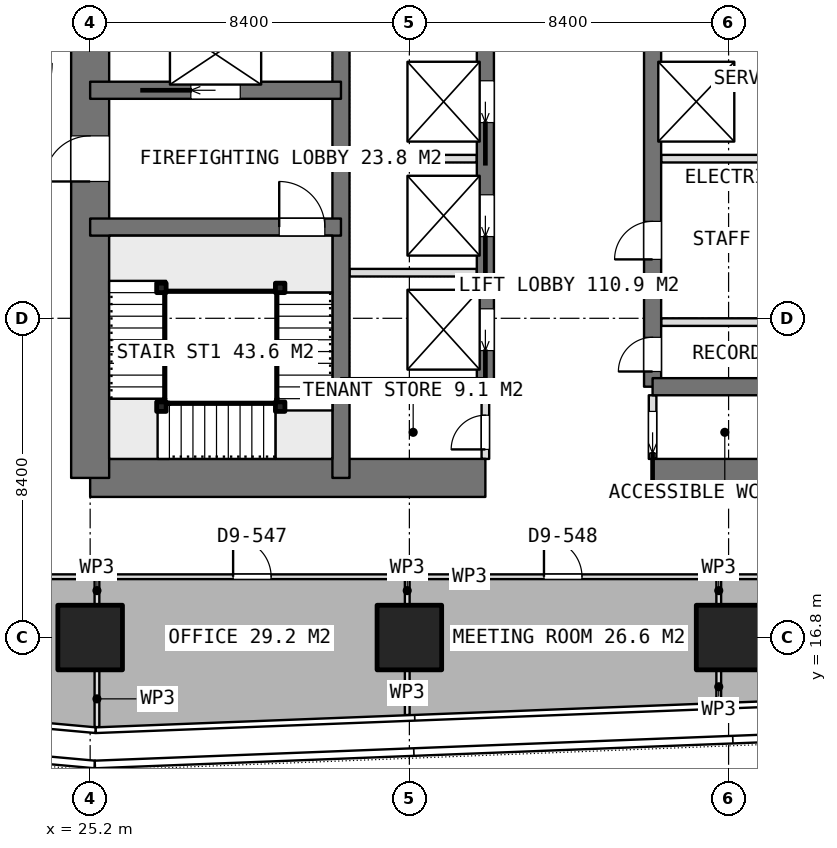
"""IFC4 building model, lengths in metres.
Left out: names, types, materials, properties, quantities, classifications, styles, units other than length and angle.
Written with IfcOpenShell. Run it as: python <this file> out.ifc"""

import sys

from ifc_helpers import new_model, si_unit, direction, frame, frame_2d, origin, origin_2d, place, context, subcontext, project, spatial, rectangle, extrude, element, fill, save


model = new_model("IFC4")
c1 = context("Model", 3, precision=1e-05, world=origin(), true_north=direction((0.0, 1.0)))
c2 = subcontext(c1, "Body", "Model", "MODEL_VIEW")
j1 = project(units=[si_unit("LENGTHUNIT", "METRE"), si_unit("PLANEANGLEUNIT", "RADIAN")], contexts=[c1])
p1 = place(None, origin())
s1 = spatial("IfcSite", under=j1, at=p1, CompositionType="ELEMENT")
p2 = place(p1, origin())
s2 = spatial("IfcBuilding", under=s1, at=p2, CompositionType="ELEMENT")
p3 = place(p2, frame((0.0, 0.0, 140.3)))
s3 = spatial("IfcBuildingStorey", under=s2, at=p3, CompositionType="ELEMENT", Elevation=140.3)
p4 = place(p3, frame((25.2, 21.0, 0.0), z_axis=(0.0, 0.0, 1.0), x_axis=(1.0, 0.0, 0.0)))
e1 = element("IfcWall", 1, at=p4, inside=s3, PredefinedType="SHEAR", context=c2, shape_type="SweptSolid", body=[
    extrude(rectangle(XDim=10.4, YDim=1.0, at=frame_2d((5.2, 0.0))), origin(), (0.0, 0.0, 1.0), 3.75),
])
p5 = place(p3, frame((40.0, 21.0, 0.0), z_axis=(0.0, 0.0, 1.0), x_axis=(1.0, 0.0, 0.0)))
e2 = element("IfcWall", 2, at=p5, inside=s3, PredefinedType="SHEAR", context=c2, shape_type="SweptSolid", body=[
    extrude(rectangle(XDim=10.4, YDim=1.0, at=frame_2d((5.2, 0.0))), origin(), (0.0, 0.0, 1.0), 3.75),
])
p6 = place(p3, frame((25.2, 21.0, 0.0), z_axis=(0.0, 0.0, 1.0), x_axis=(0.0, 1.0, 0.0)))
e3 = element("IfcWall", 3, at=p6, inside=s3, PredefinedType="SHEAR", context=c2, shape_type="SweptSolid", body=[
    extrude(rectangle(XDim=25.2, YDim=1.0, at=frame_2d((12.6, 0.0))), origin(), (0.0, 0.0, 1.0), 3.75),
])
p7 = place(p6, frame((7.8, 0.0, 0.0)))
e4 = element("IfcOpeningElement", 4, at=p7, cuts=e3, PredefinedType="OPENING", context=c2, shape_type="SweptSolid", body=[
    extrude(rectangle(XDim=1.2, YDim=2.1, at=frame_2d((0.6, 1.05))), frame((0.0, 0.51, 0.0), z_axis=(0.0, -1.0, 0.0), x_axis=(1.0, 0.0, 0.0)), (0.0, 0.0, 1.0), 1.02),
])
p8 = place(p6, frame((14.25, 0.0, 0.0)))
e5 = element("IfcOpeningElement", 5, at=p8, cuts=e3, PredefinedType="OPENING", context=c2, shape_type="SweptSolid", body=[
    extrude(rectangle(XDim=0.9, YDim=2.1, at=frame_2d((0.45, 1.05))), frame((0.0, 0.51, 0.0), z_axis=(0.0, -1.0, 0.0), x_axis=(1.0, 0.0, 0.0)), (0.0, 0.0, 1.0), 1.02),
])
p9 = place(p6, frame((16.85, 0.0, 0.0)))
e6 = element("IfcOpeningElement", 6, at=p9, cuts=e3, PredefinedType="OPENING", context=c2, shape_type="SweptSolid", body=[
    extrude(rectangle(XDim=0.9, YDim=2.1, at=frame_2d((0.45, 1.05))), frame((0.0, 0.51, 0.0), z_axis=(0.0, -1.0, 0.0), x_axis=(1.0, 0.0, 0.0)), (0.0, 0.0, 1.0), 1.02),
])
p10 = place(p6, frame((19.025, 0.0, 0.0)))
e7 = element("IfcOpeningElement", 7, at=p10, cuts=e3, PredefinedType="OPENING", context=c2, shape_type="SweptSolid", body=[
    extrude(rectangle(XDim=1.2, YDim=2.1, at=frame_2d((0.6, 1.05))), frame((0.0, 0.51, 0.0), z_axis=(0.0, -1.0, 0.0), x_axis=(1.0, 0.0, 0.0)), (0.0, 0.0, 1.0), 1.02),
])
p11 = place(p3, frame((31.8, 21.0, 0.0), z_axis=(0.0, 0.0, 1.0), x_axis=(0.0, 1.0, 0.0)))
e8 = element("IfcWall", 8, at=p11, inside=s3, PredefinedType="SHEAR", context=c2, shape_type="SweptSolid", body=[
    extrude(rectangle(XDim=25.2, YDim=0.45, at=frame_2d((12.6, 0.0))), origin(), (0.0, 0.0, 1.0), 3.75),
])
p12 = place(p3, frame((35.6, 23.4, 0.0), z_axis=(0.0, 0.0, 1.0), x_axis=(0.0, 1.0, 0.0)))
e9 = element("IfcWall", 9, at=p12, inside=s3, PredefinedType="SHEAR", context=c2, shape_type="SweptSolid", body=[
    extrude(rectangle(XDim=18.0, YDim=0.45, at=frame_2d((9.0, 0.0))), origin(), (0.0, 0.0, 1.0), 3.75),
])
p13 = place(p12, frame((0.95, 0.0, 0.0)))
e10 = element("IfcOpeningElement", 10, at=p13, cuts=e9, PredefinedType="OPENING", context=c2, shape_type="SweptSolid", body=[
    extrude(rectangle(XDim=1.1, YDim=2.1, at=frame_2d((0.55, 1.05))), frame((0.0, 0.235, 0.0), z_axis=(0.0, -1.0, 0.0), x_axis=(1.0, 0.0, 0.0)), (0.0, 0.0, 1.0), 0.47),
])
p14 = place(p12, frame((3.95, 0.0, 0.0)))
e11 = element("IfcOpeningElement", 11, at=p14, cuts=e9, PredefinedType="OPENING", context=c2, shape_type="SweptSolid", body=[
    extrude(rectangle(XDim=1.1, YDim=2.1, at=frame_2d((0.55, 1.05))), frame((0.0, 0.235, 0.0), z_axis=(0.0, -1.0, 0.0), x_axis=(1.0, 0.0, 0.0)), (0.0, 0.0, 1.0), 0.47),
])
p15 = place(p12, frame((6.95, 0.0, 0.0)))
e12 = element("IfcOpeningElement", 12, at=p15, cuts=e9, PredefinedType="OPENING", context=c2, shape_type="SweptSolid", body=[
    extrude(rectangle(XDim=1.1, YDim=2.1, at=frame_2d((0.55, 1.05))), frame((0.0, 0.235, 0.0), z_axis=(0.0, -1.0, 0.0), x_axis=(1.0, 0.0, 0.0)), (0.0, 0.0, 1.0), 0.47),
])
p16 = place(p12, frame((9.95, 0.0, 0.0)))
e13 = element("IfcOpeningElement", 13, at=p16, cuts=e9, PredefinedType="OPENING", context=c2, shape_type="SweptSolid", body=[
    extrude(rectangle(XDim=1.1, YDim=2.1, at=frame_2d((0.55, 1.05))), frame((0.0, 0.235, 0.0), z_axis=(0.0, -1.0, 0.0), x_axis=(1.0, 0.0, 0.0)), (0.0, 0.0, 1.0), 0.47),
])
p17 = place(p12, frame((12.95, 0.0, 0.0)))
e14 = element("IfcOpeningElement", 14, at=p17, cuts=e9, PredefinedType="OPENING", context=c2, shape_type="SweptSolid", body=[
    extrude(rectangle(XDim=1.1, YDim=2.1, at=frame_2d((0.55, 1.05))), frame((0.0, 0.235, 0.0), z_axis=(0.0, -1.0, 0.0), x_axis=(1.0, 0.0, 0.0)), (0.0, 0.0, 1.0), 0.47),
])
p18 = place(p12, frame((15.95, 0.0, 0.0)))
e15 = element("IfcOpeningElement", 15, at=p18, cuts=e9, PredefinedType="OPENING", context=c2, shape_type="SweptSolid", body=[
    extrude(rectangle(XDim=1.1, YDim=2.1, at=frame_2d((0.55, 1.05))), frame((0.0, 0.235, 0.0), z_axis=(0.0, -1.0, 0.0), x_axis=(1.0, 0.0, 0.0)), (0.0, 0.0, 1.0), 0.47),
])
p19 = place(p3, frame((40.0, 23.4, 0.0), z_axis=(0.0, 0.0, 1.0), x_axis=(0.0, 1.0, 0.0)))
e16 = element("IfcWall", 16, at=p19, inside=s3, PredefinedType="SHEAR", context=c2, shape_type="SweptSolid", body=[
    extrude(rectangle(XDim=18.0, YDim=0.45, at=frame_2d((9.0, 0.0))), origin(), (0.0, 0.0, 1.0), 3.75),
])
p20 = place(p19, frame((0.4, 0.0, 0.0)))
e17 = element("IfcOpeningElement", 17, at=p20, cuts=e16, PredefinedType="OPENING", context=c2, shape_type="SweptSolid", body=[
    extrude(rectangle(XDim=0.9, YDim=2.1, at=frame_2d((0.45, 1.05))), frame((0.0, 0.235, 0.0), z_axis=(0.0, -1.0, 0.0), x_axis=(1.0, 0.0, 0.0)), (0.0, 0.0, 1.0), 0.47),
])
p21 = place(p19, frame((3.35, 0.0, 0.0)))
e18 = element("IfcOpeningElement", 18, at=p21, cuts=e16, PredefinedType="OPENING", context=c2, shape_type="SweptSolid", body=[
    extrude(rectangle(XDim=1.0, YDim=2.1, at=frame_2d((0.5, 1.05))), frame((0.0, 0.235, 0.0), z_axis=(0.0, -1.0, 0.0), x_axis=(1.0, 0.0, 0.0)), (0.0, 0.0, 1.0), 0.47),
])
for number, where, z_axis, x_axis in (
    (19, (31.8, 23.4, 0.0), (0.0, 0.0, 1.0), (1.0, 0.0, 0.0)),
    (20, (40.0, 23.4, 0.0), (0.0, 0.0, 1.0), (1.0, 0.0, 0.0)),
):
    element("IfcWall", number, at=place(p3, frame(where, z_axis=z_axis, x_axis=x_axis)), inside=s3, PredefinedType="SHEAR", context=c2, shape_type="SweptSolid", body=[
        extrude(rectangle(XDim=3.8, YDim=0.45, at=frame_2d((1.9, 0.0))), origin(), (0.0, 0.0, 1.0), 3.75),
    ])
p22 = place(p3, frame((25.2, 27.6, 0.0), z_axis=(0.0, 0.0, 1.0), x_axis=(1.0, 0.0, 0.0)))
e21 = element("IfcWall", 21, at=p22, inside=s3, PredefinedType="SHEAR", context=c2, shape_type="SweptSolid", body=[
    extrude(rectangle(XDim=6.6, YDim=0.45, at=frame_2d((3.3, 0.0))), origin(), (0.0, 0.0, 1.0), 3.75),
])
p23 = place(p22, frame((4.975, 0.0, 0.0)))
e22 = element("IfcOpeningElement", 22, at=p23, cuts=e21, PredefinedType="OPENING", context=c2, shape_type="SweptSolid", body=[
    extrude(rectangle(XDim=1.2, YDim=2.1, at=frame_2d((0.6, 1.05))), frame((0.0, 0.235, 0.0), z_axis=(0.0, -1.0, 0.0), x_axis=(1.0, 0.0, 0.0)), (0.0, 0.0, 1.0), 0.47),
])
p24 = place(p3, frame((25.2, 31.2, 0.0), z_axis=(0.0, 0.0, 1.0), x_axis=(1.0, 0.0, 0.0)))
e23 = element("IfcWall", 23, at=p24, inside=s3, PredefinedType="SHEAR", context=c2, shape_type="SweptSolid", body=[
    extrude(rectangle(XDim=6.6, YDim=0.45, at=frame_2d((3.3, 0.0))), origin(), (0.0, 0.0, 1.0), 3.75),
])
p25 = place(p24, frame((2.65, 0.0, 0.0)))
e24 = element("IfcOpeningElement", 24, at=p25, cuts=e23, PredefinedType="OPENING", context=c2, shape_type="SweptSolid", body=[
    extrude(rectangle(XDim=1.3, YDim=2.1, at=frame_2d((0.65, 1.05))), frame((0.0, 0.235, 0.0), z_axis=(0.0, -1.0, 0.0), x_axis=(1.0, 0.0, 0.0)), (0.0, 0.0, 1.0), 0.47),
])
for number, where, z_axis, x_axis in (
    (25, (25.2, 16.8, 0.0), (0.0, 0.0, 1.0), (1.0, 0.0, 0.0)),
    (26, (33.6, 16.8, 0.0), (0.0, 0.0, 1.0), (1.0, 0.0, 0.0)),
    (27, (42.0, 16.8, 0.0), (0.0, 0.0, 1.0), (1.0, 0.0, 0.0)),
):
    element("IfcColumn", number, at=place(p3, frame(where, z_axis=z_axis, x_axis=x_axis)), inside=s3, PredefinedType="COLUMN", context=c2, shape_type="SweptSolid", body=[
        extrude(rectangle(XDim=1.7, YDim=1.7, at=origin_2d()), origin(), (0.0, 0.0, 1.0), 3.75),
    ])
for number, where, z_axis, x_axis in (
    (28, (32.025, 26.4, 0.0), (0.0, 0.0, 1.0), (1.0, 0.0, 0.0)),
    (29, (32.025, 29.4, 0.0), (0.0, 0.0, 1.0), (1.0, 0.0, 0.0)),
):
    element("IfcWall", number, at=place(p3, frame(where, z_axis=z_axis, x_axis=x_axis)), inside=s3, PredefinedType="PARTITIONING", context=c2, shape_type="SweptSolid", body=[
        extrude(rectangle(XDim=3.35, YDim=0.2, at=frame_2d((1.675, 0.0))), origin(), (0.0, 0.0, 1.0), 3.5),
    ])
p26 = place(p3, frame((40.225, 29.4, 0.0), z_axis=(0.0, 0.0, 1.0), x_axis=(1.0, 0.0, 0.0)))
e30 = element("IfcWall", 30, at=p26, inside=s3, PredefinedType="PARTITIONING", context=c2, shape_type="SweptSolid", body=[
    extrude(rectangle(XDim=3.35, YDim=0.2, at=frame_2d((1.675, 0.0))), origin(), (0.0, 0.0, 1.0), 3.5),
])
p27 = place(p3, frame((40.0, 21.5, 0.0), z_axis=(0.0, 0.0, 1.0), x_axis=(0.0, 1.0, 0.0)))
e31 = element("IfcWall", 31, at=p27, inside=s3, PredefinedType="PARTITIONING", context=c2, shape_type="SweptSolid", body=[
    extrude(rectangle(XDim=1.675, YDim=0.2, at=frame_2d((0.837, 0.0))), origin(), (0.0, 0.0, 1.0), 3.5),
])
p28 = place(p27, frame((0.15, 0.0, 0.0)))
e32 = element("IfcOpeningElement", 32, at=p28, cuts=e31, PredefinedType="OPENING", context=c2, shape_type="SweptSolid", body=[
    extrude(rectangle(XDim=1.1, YDim=2.1, at=frame_2d((0.55, 1.05))), frame((0.0, 0.11, 0.0), z_axis=(0.0, -1.0, 0.0), x_axis=(1.0, 0.0, 0.0)), (0.0, 0.0, 1.0), 0.22),
])
p29 = place(p3, frame((35.6, 21.5, 0.0), z_axis=(0.0, 0.0, 1.0), x_axis=(0.0, 1.0, 0.0)))
e33 = element("IfcWall", 33, at=p29, inside=s3, PredefinedType="PARTITIONING", context=c2, shape_type="SweptSolid", body=[
    extrude(rectangle(XDim=1.675, YDim=0.2, at=frame_2d((0.837, 0.0))), origin(), (0.0, 0.0, 1.0), 3.5),
])
p30 = place(p29, frame((0.25, 0.0, 0.0)))
e34 = element("IfcOpeningElement", 34, at=p30, cuts=e33, PredefinedType="OPENING", context=c2, shape_type="SweptSolid", body=[
    extrude(rectangle(XDim=0.9, YDim=2.1, at=frame_2d((0.45, 1.05))), frame((0.0, 0.11, 0.0), z_axis=(0.0, -1.0, 0.0), x_axis=(1.0, 0.0, 0.0)), (0.0, 0.0, 1.0), 0.22),
])
p31 = place(p3, frame((40.225, 25.1, 0.0), z_axis=(0.0, 0.0, 1.0), x_axis=(1.0, 0.0, 0.0)))
e35 = element("IfcWall", 35, at=p31, inside=s3, PredefinedType="PARTITIONING", context=c2, shape_type="SweptSolid", body=[
    extrude(rectangle(XDim=3.35, YDim=0.2, at=frame_2d((1.675, 0.0))), origin(), (0.0, 0.0, 1.0), 3.5),
])
p32 = place(p3, frame((41.741, 15.08, 0.0), z_axis=(0.0, 0.0, 1.0), x_axis=(0.0, 1.0, 0.0)))
e36 = element("IfcWall", 36, at=p32, inside=s3, PredefinedType="PARTITIONING", context=c2, shape_type="SweptSolid", body=[
    extrude(rectangle(XDim=0.85, YDim=0.125, at=frame_2d((0.425, 0.0))), origin(), (0.0, 0.0, 1.0), 3.5),
])
p33 = place(p3, frame((41.741, 17.67, 0.0), z_axis=(0.0, 0.0, 1.0), x_axis=(0.0, 1.0, 0.0)))
e37 = element("IfcWall", 37, at=p33, inside=s3, PredefinedType="PARTITIONING", context=c2, shape_type="SweptSolid", body=[
    extrude(rectangle(XDim=0.73, YDim=0.125, at=frame_2d((0.365, 0.0))), origin(), (0.0, 0.0, 1.0), 3.5),
])
p34 = place(p3, frame((41.741, 18.4, 0.0), z_axis=(0.0, 0.0, 1.0), x_axis=(1.0, 0.0, 0.0)))
e38 = element("IfcWall", 38, at=p34, inside=s3, PredefinedType="PARTITIONING", context=c2, shape_type="SweptSolid", body=[
    extrude(rectangle(XDim=8.195, YDim=0.125, at=frame_2d((4.098, 0.0))), origin(), (0.0, 0.0, 1.0), 3.5),
])
p35 = place(p34, frame((3.597, 0.0, 0.0)))
e39 = element("IfcOpeningElement", 39, at=p35, cuts=e38, PredefinedType="OPENING", context=c2, shape_type="SweptSolid", body=[
    extrude(rectangle(XDim=1.0, YDim=2.1, at=frame_2d((0.5, 1.05))), frame((0.0, 0.073, 0.0), z_axis=(0.0, -1.0, 0.0), x_axis=(1.0, 0.0, 0.0)), (0.0, 0.0, 1.0), 0.145),
])
p36 = place(p3, frame((19.2, 18.4, 0.0), z_axis=(0.0, 0.0, 1.0), x_axis=(1.0, 0.0, 0.0)))
e40 = element("IfcWall", 40, at=p36, inside=s3, PredefinedType="PARTITIONING", context=c2, shape_type="SweptSolid", body=[
    extrude(rectangle(XDim=6.179, YDim=0.125, at=frame_2d((3.089, 0.0))), origin(), (0.0, 0.0, 1.0), 3.5),
])
p37 = place(p3, frame((25.379, 18.4, 0.0), z_axis=(0.0, 0.0, 1.0), x_axis=(0.0, -1.0, 0.0)))
e41 = element("IfcWall", 41, at=p37, inside=s3, PredefinedType="PARTITIONING", context=c2, shape_type="SweptSolid", body=[
    extrude(rectangle(XDim=0.73, YDim=0.125, at=frame_2d((0.365, 0.0))), origin(), (0.0, 0.0, 1.0), 3.5),
])
p38 = place(p3, frame((25.379, 15.93, 0.0), z_axis=(0.0, 0.0, 1.0), x_axis=(0.0, -1.0, 0.0)))
e42 = element("IfcWall", 42, at=p38, inside=s3, PredefinedType="PARTITIONING", context=c2, shape_type="SweptSolid", body=[
    extrude(rectangle(XDim=1.487, YDim=0.125, at=frame_2d((0.743, 0.0))), origin(), (0.0, 0.0, 1.0), 3.5),
])
p39 = place(p3, frame((25.38, 18.4, 0.0), z_axis=(0.0, 0.0, 1.0), x_axis=(1.0, 0.0, 0.0)))
e43 = element("IfcWall", 43, at=p39, inside=s3, PredefinedType="PARTITIONING", context=c2, shape_type="SweptSolid", body=[
    extrude(rectangle(XDim=8.164, YDim=0.125, at=frame_2d((4.082, 0.0))), origin(), (0.0, 0.0, 1.0), 3.5),
])
p40 = place(p39, frame((3.582, 0.0, 0.0)))
e44 = element("IfcOpeningElement", 44, at=p40, cuts=e43, PredefinedType="OPENING", context=c2, shape_type="SweptSolid", body=[
    extrude(rectangle(XDim=1.0, YDim=2.1, at=frame_2d((0.5, 1.05))), frame((0.0, 0.073, 0.0), z_axis=(0.0, -1.0, 0.0), x_axis=(1.0, 0.0, 0.0)), (0.0, 0.0, 1.0), 0.145),
])
p41 = place(p3, frame((33.544, 18.4, 0.0), z_axis=(0.0, 0.0, 1.0), x_axis=(0.0, -1.0, 0.0)))
e45 = element("IfcWall", 45, at=p41, inside=s3, PredefinedType="PARTITIONING", context=c2, shape_type="SweptSolid", body=[
    extrude(rectangle(XDim=0.73, YDim=0.125, at=frame_2d((0.365, 0.0))), origin(), (0.0, 0.0, 1.0), 3.5),
])
p42 = place(p3, frame((33.544, 15.93, 0.0), z_axis=(0.0, 0.0, 1.0), x_axis=(0.0, -1.0, 0.0)))
e46 = element("IfcWall", 46, at=p42, inside=s3, PredefinedType="PARTITIONING", context=c2, shape_type="SweptSolid", body=[
    extrude(rectangle(XDim=1.169, YDim=0.125, at=frame_2d((0.584, 0.0))), origin(), (0.0, 0.0, 1.0), 3.5),
])
p43 = place(p3, frame((33.544, 18.4, 0.0), z_axis=(0.0, 0.0, 1.0), x_axis=(1.0, 0.0, 0.0)))
e47 = element("IfcWall", 47, at=p43, inside=s3, PredefinedType="PARTITIONING", context=c2, shape_type="SweptSolid", body=[
    extrude(rectangle(XDim=8.196, YDim=0.125, at=frame_2d((4.098, 0.0))), origin(), (0.0, 0.0, 1.0), 3.5),
])
p44 = place(p43, frame((3.598, 0.0, 0.0)))
e48 = element("IfcOpeningElement", 48, at=p44, cuts=e47, PredefinedType="OPENING", context=c2, shape_type="SweptSolid", body=[
    extrude(rectangle(XDim=1.0, YDim=2.1, at=frame_2d((0.5, 1.05))), frame((0.0, 0.073, 0.0), z_axis=(0.0, -1.0, 0.0), x_axis=(1.0, 0.0, 0.0)), (0.0, 0.0, 1.0), 0.145),
])
for number, where, z_axis, x_axis in (
    (49, (30.2, 26.0, 0.0), (0.0, 0.0, 1.0), (1.0, 0.0, 0.0)),
    (50, (30.2, 22.875, 0.0), (0.0, 0.0, 1.0), (1.0, 0.0, 0.0)),
    (51, (27.075, 22.875, 0.0), (0.0, 0.0, 1.0), (1.0, 0.0, 0.0)),
    (52, (27.075, 26.0, 0.0), (0.0, 0.0, 1.0), (1.0, 0.0, 0.0)),
):
    element("IfcColumn", number, at=place(p3, frame(where, z_axis=z_axis, x_axis=x_axis)), inside=s3, PredefinedType="COLUMN", context=c2, shape_type="SweptSolid", body=[
        extrude(rectangle(XDim=0.25, YDim=0.25, at=origin_2d()), origin(), (0.0, 0.0, 1.0), 3.75),
    ])
p45 = place(p7, origin())
e53 = element("IfcDoor", 53, at=p45, inside=s3, OperationType="SINGLE_SWING_LEFT", PredefinedType="DOOR", context=c2, shape_type="SweptSolid", body=[
    extrude(rectangle(XDim=1.2, YDim=2.1, at=frame_2d((0.6, 1.05))), frame((0.0, 0.025, 0.0), z_axis=(0.0, -1.0, 0.0), x_axis=(1.0, 0.0, 0.0)), (0.0, 0.0, 1.0), 0.05),
])
fill(e4, e53)
p46 = place(p28, origin())
e54 = element("IfcDoor", 54, at=p46, inside=s3, OperationType="SLIDING_TO_LEFT", PredefinedType="DOOR", context=c2, shape_type="SweptSolid", body=[
    extrude(rectangle(XDim=1.1, YDim=2.1, at=frame_2d((0.55, 1.05))), frame((0.0, 0.025, 0.0), z_axis=(0.0, -1.0, 0.0), x_axis=(1.0, 0.0, 0.0)), (0.0, 0.0, 1.0), 0.05),
])
fill(e32, e54)
p47 = place(p30, origin())
e55 = element("IfcDoor", 55, at=p47, inside=s3, OperationType="SINGLE_SWING_LEFT", PredefinedType="DOOR", context=c2, shape_type="SweptSolid", body=[
    extrude(rectangle(XDim=0.9, YDim=2.1, at=frame_2d((0.45, 1.05))), frame((0.0, 0.025, 0.0), z_axis=(0.0, -1.0, 0.0), x_axis=(1.0, 0.0, 0.0)), (0.0, 0.0, 1.0), 0.05),
])
fill(e34, e55)
p48 = place(p20, origin())
e56 = element("IfcDoor", 56, at=p48, inside=s3, OperationType="SINGLE_SWING_LEFT", PredefinedType="DOOR", context=c2, shape_type="SweptSolid", body=[
    extrude(rectangle(XDim=0.9, YDim=2.1, at=frame_2d((0.45, 1.05))), frame((0.0, 0.025, 0.0), z_axis=(0.0, -1.0, 0.0), x_axis=(1.0, 0.0, 0.0)), (0.0, 0.0, 1.0), 0.05),
])
fill(e17, e56)
p49 = place(p21, origin())
e57 = element("IfcDoor", 57, at=p49, inside=s3, OperationType="SINGLE_SWING_LEFT", PredefinedType="DOOR", context=c2, shape_type="SweptSolid", body=[
    extrude(rectangle(XDim=1.0, YDim=2.1, at=frame_2d((0.5, 1.05))), frame((0.0, 0.025, 0.0), z_axis=(0.0, -1.0, 0.0), x_axis=(1.0, 0.0, 0.0)), (0.0, 0.0, 1.0), 0.05),
])
fill(e18, e57)
p50 = place(p13, origin())
e58 = element("IfcDoor", 58, at=p50, inside=s3, OperationType="SLIDING_TO_LEFT", PredefinedType="USERDEFINED", context=c2, shape_type="SweptSolid", body=[
    extrude(rectangle(XDim=1.1, YDim=2.1, at=frame_2d((0.55, 1.05))), frame((0.0, 0.025, 0.0), z_axis=(0.0, -1.0, 0.0), x_axis=(1.0, 0.0, 0.0)), (0.0, 0.0, 1.0), 0.05),
])
fill(e10, e58)
p51 = place(p14, origin())
e59 = element("IfcDoor", 59, at=p51, inside=s3, OperationType="SLIDING_TO_LEFT", PredefinedType="USERDEFINED", context=c2, shape_type="SweptSolid", body=[
    extrude(rectangle(XDim=1.1, YDim=2.1, at=frame_2d((0.55, 1.05))), frame((0.0, 0.025, 0.0), z_axis=(0.0, -1.0, 0.0), x_axis=(1.0, 0.0, 0.0)), (0.0, 0.0, 1.0), 0.05),
])
fill(e11, e59)
p52 = place(p15, origin())
e60 = element("IfcDoor", 60, at=p52, inside=s3, OperationType="SLIDING_TO_LEFT", PredefinedType="USERDEFINED", context=c2, shape_type="SweptSolid", body=[
    extrude(rectangle(XDim=1.1, YDim=2.1, at=frame_2d((0.55, 1.05))), frame((0.0, 0.025, 0.0), z_axis=(0.0, -1.0, 0.0), x_axis=(1.0, 0.0, 0.0)), (0.0, 0.0, 1.0), 0.05),
])
fill(e12, e60)
p53 = place(p25, origin())
e61 = element("IfcDoor", 61, at=p53, inside=s3, OperationType="SLIDING_TO_LEFT", PredefinedType="USERDEFINED", context=c2, shape_type="SweptSolid", body=[
    extrude(rectangle(XDim=1.3, YDim=2.1, at=frame_2d((0.65, 1.05))), frame((0.0, 0.025, 0.0), z_axis=(0.0, -1.0, 0.0), x_axis=(1.0, 0.0, 0.0)), (0.0, 0.0, 1.0), 0.05),
])
fill(e24, e61)
p54 = place(p40, origin())
e62 = element("IfcDoor", 62, at=p54, inside=s3, OperationType="SINGLE_SWING_LEFT", PredefinedType="DOOR", context=c2, shape_type="SweptSolid", body=[
    extrude(rectangle(XDim=1.0, YDim=2.1, at=frame_2d((0.5, 1.05))), frame((0.0, 0.025, 0.0), z_axis=(0.0, -1.0, 0.0), x_axis=(1.0, 0.0, 0.0)), (0.0, 0.0, 1.0), 0.05),
])
fill(e44, e62)
p55 = place(p44, origin())
e63 = element("IfcDoor", 63, at=p55, inside=s3, OperationType="SINGLE_SWING_LEFT", PredefinedType="DOOR", context=c2, shape_type="SweptSolid", body=[
    extrude(rectangle(XDim=1.0, YDim=2.1, at=frame_2d((0.5, 1.05))), frame((0.0, 0.025, 0.0), z_axis=(0.0, -1.0, 0.0), x_axis=(1.0, 0.0, 0.0)), (0.0, 0.0, 1.0), 0.05),
])
fill(e48, e63)
p56 = place(p23, origin())
e64 = element("IfcDoor", 64, at=p56, inside=s3, OperationType="SINGLE_SWING_RIGHT", PredefinedType="DOOR", context=c2, shape_type="SweptSolid", body=[
    extrude(rectangle(XDim=1.2, YDim=2.1, at=frame_2d((0.6, 1.05))), frame((0.0, 0.025, 0.0), z_axis=(0.0, -1.0, 0.0), x_axis=(1.0, 0.0, 0.0)), (0.0, 0.0, 1.0), 0.05),
])
fill(e22, e64)
save(model, sys.argv[1])
